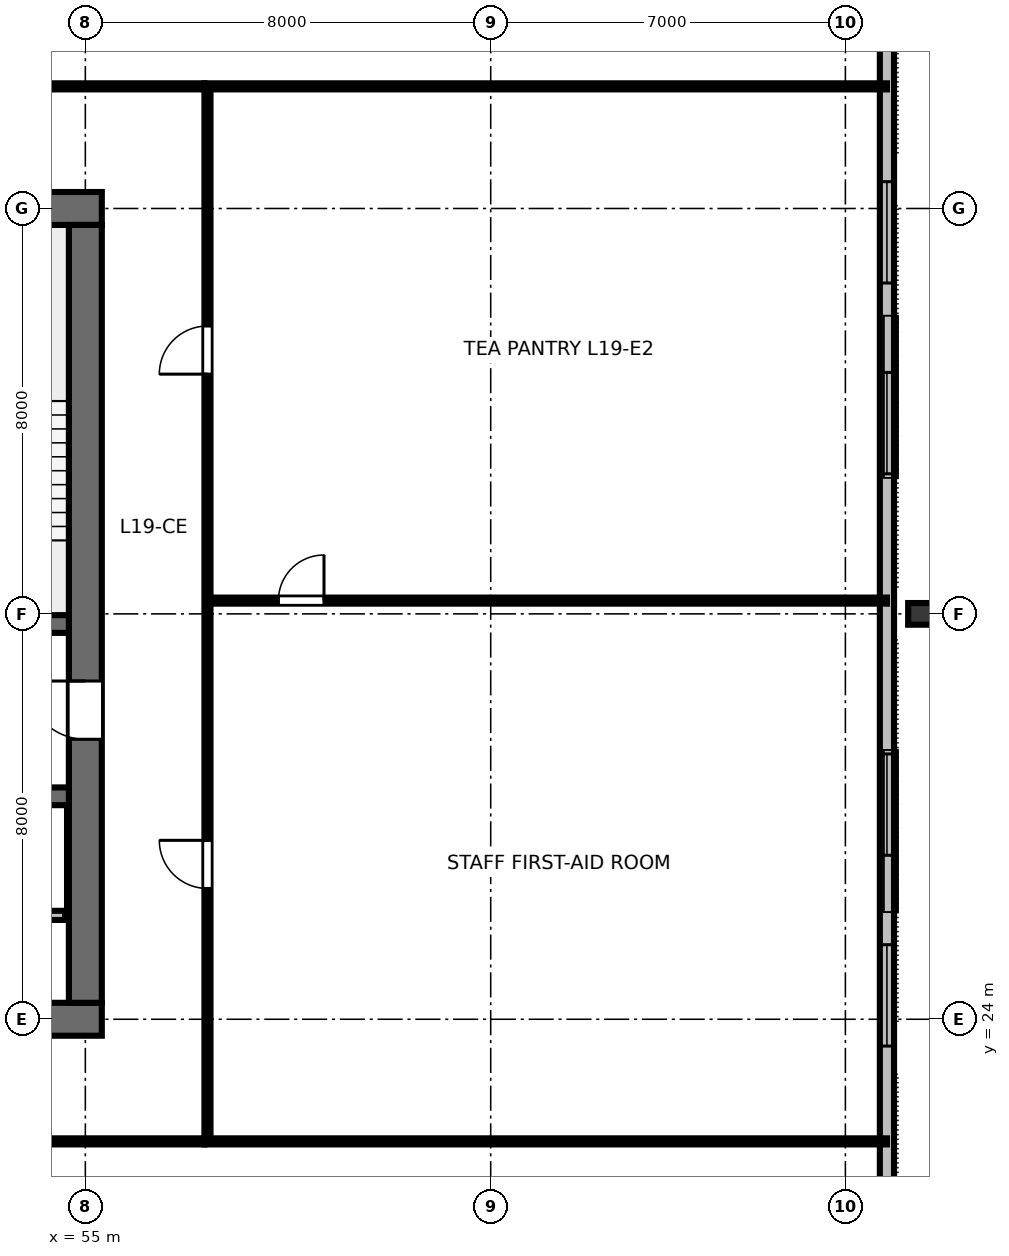
"""IFC4 building model, lengths in metres.
Left out: names, types, materials, properties, quantities, classifications, styles, units other than length and angle.
Written with IfcOpenShell. Run it as: python <this file> out.ifc"""

import sys

from ifc_helpers import new_model, si_unit, direction, frame, frame_2d, origin, origin_2d, place, context, subcontext, project, spatial, rectangle, i_section, extrude, element, fill, save


model = new_model("IFC4")
c1 = context("Model", 3, precision=1e-05, world=origin(), true_north=direction((0.0, 1.0)))
c2 = subcontext(c1, "Body", "Model", "MODEL_VIEW")
j1 = project(units=[si_unit("LENGTHUNIT", "METRE"), si_unit("PLANEANGLEUNIT", "RADIAN")], contexts=[c1])
p1 = place(None, origin())
s1 = spatial("IfcSite", under=j1, at=p1, CompositionType="ELEMENT")
p2 = place(p1, origin())
s2 = spatial("IfcBuilding", under=s1, at=p2, CompositionType="ELEMENT")
p3 = place(p2, frame((0.0, 0.0, 74.8)))
s3 = spatial("IfcBuildingStorey", under=s2, at=p3, CompositionType="ELEMENT", Elevation=74.8)
p4 = place(p3, frame((36.675, 24.0, 0.0), z_axis=(0.0, 0.0, 1.0), x_axis=(1.0, 0.0, 0.0)))
e1 = element("IfcWall", 1, at=p4, inside=s3, PredefinedType="SHEAR", context=c2, shape_type="SweptSolid", body=[
    extrude(rectangle(XDim=18.65, YDim=0.65, at=frame_2d((9.325, 0.0))), origin(), (0.0, 0.0, 1.0), 3.36),
])
p5 = place(p4, frame((5.725, 0.0, 0.0)))
e2 = element("IfcOpeningElement", 2, at=p5, cuts=e1, PredefinedType="OPENING", context=c2, shape_type="SweptSolid", body=[
    extrude(rectangle(XDim=1.6, YDim=2.15, at=frame_2d((0.8, 1.075))), frame((0.0, 0.335, 0.0), z_axis=(0.0, -1.0, 0.0), x_axis=(1.0, 0.0, 0.0)), (0.0, 0.0, 1.0), 0.67),
])
p6 = place(p4, frame((12.125, 0.0, 0.0)))
e3 = element("IfcOpeningElement", 3, at=p6, cuts=e1, PredefinedType="OPENING", context=c2, shape_type="SweptSolid", body=[
    extrude(rectangle(XDim=1.6, YDim=2.15, at=frame_2d((0.8, 1.075))), frame((0.0, 0.335, 0.0), z_axis=(0.0, -1.0, 0.0), x_axis=(1.0, 0.0, 0.0)), (0.0, 0.0, 1.0), 0.67),
])
p7 = place(p3, frame((36.675, 40.0, 0.0), z_axis=(0.0, 0.0, 1.0), x_axis=(1.0, 0.0, 0.0)))
e4 = element("IfcWall", 4, at=p7, inside=s3, PredefinedType="SHEAR", context=c2, shape_type="SweptSolid", body=[
    extrude(rectangle(XDim=18.65, YDim=0.65, at=frame_2d((9.325, 0.0))), origin(), (0.0, 0.0, 1.0), 3.36),
])
p8 = place(p7, frame((8.825, 0.0, 0.0)))
e5 = element("IfcOpeningElement", 5, at=p8, cuts=e4, PredefinedType="OPENING", context=c2, shape_type="SweptSolid", body=[
    extrude(rectangle(XDim=1.0, YDim=2.15, at=frame_2d((0.5, 1.075))), frame((0.0, 0.335, 0.0), z_axis=(0.0, -1.0, 0.0), x_axis=(1.0, 0.0, 0.0)), (0.0, 0.0, 1.0), 0.67),
])
p9 = place(p3, frame((55.0, 24.325, 0.0), z_axis=(0.0, 0.0, 1.0), x_axis=(0.0, 1.0, 0.0)))
e6 = element("IfcWall", 6, at=p9, inside=s3, PredefinedType="SHEAR", context=c2, shape_type="SweptSolid", body=[
    extrude(rectangle(XDim=15.35, YDim=0.65, at=frame_2d((7.675, 0.0))), origin(), (0.0, 0.0, 1.0), 3.36),
])
p10 = place(p9, frame((5.2, 0.0, 0.0)))
e7 = element("IfcOpeningElement", 7, at=p10, cuts=e6, PredefinedType="OPENING", context=c2, shape_type="SweptSolid", body=[
    extrude(rectangle(XDim=1.15, YDim=2.15, at=frame_2d((0.575, 1.075))), frame((0.0, 0.335, 0.0), z_axis=(0.0, -1.0, 0.0), x_axis=(1.0, 0.0, 0.0)), (0.0, 0.0, 1.0), 0.67),
])
p11 = place(p3, frame((37.325, 31.8, 0.0), z_axis=(0.0, 0.0, 1.0), x_axis=(1.0, 0.0, 0.0)))
e8 = element("IfcWall", 8, at=p11, inside=s3, PredefinedType="SHEAR", context=c2, shape_type="SweptSolid", body=[
    extrude(rectangle(XDim=17.35, YDim=0.35, at=frame_2d((8.675, 0.0))), origin(), (0.0, 0.0, 1.0), 3.36),
])
p12 = place(p11, frame((0.725, 0.0, 0.0)))
e9 = element("IfcOpeningElement", 9, at=p12, cuts=e8, PredefinedType="OPENING", context=c2, shape_type="SweptSolid", body=[
    extrude(rectangle(XDim=1.1, YDim=2.15, at=frame_2d((0.55, 1.075))), frame((0.0, 0.185, 0.0), z_axis=(0.0, -1.0, 0.0), x_axis=(1.0, 0.0, 0.0)), (0.0, 0.0, 1.0), 0.37),
])
p13 = place(p11, frame((14.625, 0.0, 0.0)))
e10 = element("IfcOpeningElement", 10, at=p13, cuts=e8, PredefinedType="OPENING", context=c2, shape_type="SweptSolid", body=[
    extrude(rectangle(XDim=1.1, YDim=2.15, at=frame_2d((0.55, 1.075))), frame((0.0, 0.185, 0.0), z_axis=(0.0, -1.0, 0.0), x_axis=(1.0, 0.0, 0.0)), (0.0, 0.0, 1.0), 0.37),
])
p14 = place(p3, frame((37.325, 28.4, 0.0), z_axis=(0.0, 0.0, 1.0), x_axis=(1.0, 0.0, 0.0)))
e11 = element("IfcWall", 11, at=p14, inside=s3, PredefinedType="SHEAR", context=c2, shape_type="SweptSolid", body=[
    extrude(rectangle(XDim=17.35, YDim=0.35, at=frame_2d((8.675, 0.0))), origin(), (0.0, 0.0, 1.0), 3.36),
])
p15 = place(p3, frame((71.48, 32.0, 0.0), z_axis=(0.0, 0.0, 1.0), x_axis=(0.0, 1.0, 0.0)))
e12 = element("IfcColumn", 12, at=p15, inside=s3, PredefinedType="COLUMN", context=c2, shape_type="SweptSolid", body=[
    extrude(i_section(OverallWidth=0.428, OverallDepth=0.483, WebThickness=0.051, FlangeThickness=0.082, FilletRadius=0.025, at=origin_2d()), origin(), (0.0, 0.0, 1.0), 3.358),
])
p16 = place(p3, frame((70.82, 13.96, 0.0), z_axis=(0.0, 0.0, 1.0), x_axis=(0.0, 1.0, 0.0)))
e13 = element("IfcWall", 13, at=p16, inside=s3, PredefinedType="STANDARD", context=c2, shape_type="SweptSolid", body=[
    extrude(rectangle(XDim=36.08, YDim=0.28, at=frame_2d((18.04, 0.0))), origin(), (0.0, 0.0, 1.0), 3.36),
])
p17 = place(p16, frame((1.982, 0.0, 0.8)))
e14 = element("IfcOpeningElement", 14, at=p17, cuts=e13, PredefinedType="OPENING", context=c2, shape_type="SweptSolid", body=[
    extrude(rectangle(XDim=2.0, YDim=1.95, at=frame_2d((1.0, 0.975))), frame((0.0, 0.15, 0.0), z_axis=(0.0, -1.0, 0.0), x_axis=(1.0, 0.0, 0.0)), (0.0, 0.0, 1.0), 0.3),
])
p18 = place(p16, frame((9.511, 0.0, 0.8)))
e15 = element("IfcOpeningElement", 15, at=p18, cuts=e13, PredefinedType="OPENING", context=c2, shape_type="SweptSolid", body=[
    extrude(rectangle(XDim=2.0, YDim=1.95, at=frame_2d((1.0, 0.975))), frame((0.0, 0.15, 0.0), z_axis=(0.0, -1.0, 0.0), x_axis=(1.0, 0.0, 0.0)), (0.0, 0.0, 1.0), 0.3),
])
p19 = place(p16, frame((13.276, 0.0, 0.8)))
e16 = element("IfcOpeningElement", 16, at=p19, cuts=e13, PredefinedType="OPENING", context=c2, shape_type="SweptSolid", body=[
    extrude(rectangle(XDim=2.0, YDim=1.95, at=frame_2d((1.0, 0.975))), frame((0.0, 0.15, 0.0), z_axis=(0.0, -1.0, 0.0), x_axis=(1.0, 0.0, 0.0)), (0.0, 0.0, 1.0), 0.3),
])
p20 = place(p16, frame((20.804, 0.0, 0.8)))
e17 = element("IfcOpeningElement", 17, at=p20, cuts=e13, PredefinedType="OPENING", context=c2, shape_type="SweptSolid", body=[
    extrude(rectangle(XDim=2.0, YDim=1.95, at=frame_2d((1.0, 0.975))), frame((0.0, 0.15, 0.0), z_axis=(0.0, -1.0, 0.0), x_axis=(1.0, 0.0, 0.0)), (0.0, 0.0, 1.0), 0.3),
])
p21 = place(p16, frame((24.569, 0.0, 0.8)))
e18 = element("IfcOpeningElement", 18, at=p21, cuts=e13, PredefinedType="OPENING", context=c2, shape_type="SweptSolid", body=[
    extrude(rectangle(XDim=2.0, YDim=1.95, at=frame_2d((1.0, 0.975))), frame((0.0, 0.15, 0.0), z_axis=(0.0, -1.0, 0.0), x_axis=(1.0, 0.0, 0.0)), (0.0, 0.0, 1.0), 0.3),
])
p22 = place(p16, frame((32.098, 0.0, 0.8)))
e19 = element("IfcOpeningElement", 19, at=p22, cuts=e13, PredefinedType="OPENING", context=c2, shape_type="SweptSolid", body=[
    extrude(rectangle(XDim=2.0, YDim=1.95, at=frame_2d((1.0, 0.975))), frame((0.0, 0.15, 0.0), z_axis=(0.0, -1.0, 0.0), x_axis=(1.0, 0.0, 0.0)), (0.0, 0.0, 1.0), 0.3),
])
p23 = place(p3, frame((37.4, 26.05, 0.0), z_axis=(0.0, 0.0, 1.0), x_axis=(1.0, 0.0, 0.0)))
e20 = element("IfcWall", 20, at=p23, inside=s3, PredefinedType="PARTITIONING", context=c2, shape_type="SweptSolid", body=[
    extrude(rectangle(XDim=17.2, YDim=0.18, at=frame_2d((8.6, 0.0))), origin(), (0.0, 0.0, 1.0), 3.36),
])
p24 = place(p23, frame((1.1, 0.0, 0.0)))
e21 = element("IfcOpeningElement", 21, at=p24, cuts=e20, PredefinedType="OPENING", context=c2, shape_type="SweptSolid", body=[
    extrude(rectangle(XDim=1.05, YDim=2.15, at=frame_2d((0.525, 1.075))), frame((0.0, 0.1, 0.0), z_axis=(0.0, -1.0, 0.0), x_axis=(1.0, 0.0, 0.0)), (0.0, 0.0, 1.0), 0.2),
])
p25 = place(p23, frame((3.0, 0.0, 0.0)))
e22 = element("IfcOpeningElement", 22, at=p25, cuts=e20, PredefinedType="OPENING", context=c2, shape_type="SweptSolid", body=[
    extrude(rectangle(XDim=1.05, YDim=2.15, at=frame_2d((0.525, 1.075))), frame((0.0, 0.1, 0.0), z_axis=(0.0, -1.0, 0.0), x_axis=(1.0, 0.0, 0.0)), (0.0, 0.0, 1.0), 0.2),
])
p26 = place(p3, frame((34.65, 21.59, 0.0), z_axis=(0.0, 0.0, 1.0), x_axis=(1.0, 0.0, 0.0)))
e23 = element("IfcWall", 23, at=p26, inside=s3, PredefinedType="PARTITIONING", context=c2, shape_type="SweptSolid", body=[
    extrude(rectangle(XDim=22.7, YDim=0.12, at=frame_2d((11.35, 0.0))), origin(), (0.0, 0.0, 1.0), 2.64),
])
p27 = place(p26, frame((3.463, 0.0, 0.0)))
e24 = element("IfcOpeningElement", 24, at=p27, cuts=e23, PredefinedType="OPENING", context=c2, shape_type="SweptSolid", body=[
    extrude(rectangle(XDim=0.95, YDim=2.15, at=frame_2d((0.475, 1.075))), frame((0.0, 0.07, 0.0), z_axis=(0.0, -1.0, 0.0), x_axis=(1.0, 0.0, 0.0)), (0.0, 0.0, 1.0), 0.14),
])
p28 = place(p26, frame((14.673, 0.0, 0.0)))
e25 = element("IfcOpeningElement", 25, at=p28, cuts=e23, PredefinedType="OPENING", context=c2, shape_type="SweptSolid", body=[
    extrude(rectangle(XDim=0.95, YDim=2.15, at=frame_2d((0.475, 1.075))), frame((0.0, 0.07, 0.0), z_axis=(0.0, -1.0, 0.0), x_axis=(1.0, 0.0, 0.0)), (0.0, 0.0, 1.0), 0.14),
])
p29 = place(p3, frame((34.65, 42.41, 0.0), z_axis=(0.0, 0.0, 1.0), x_axis=(1.0, 0.0, 0.0)))
e26 = element("IfcWall", 26, at=p29, inside=s3, PredefinedType="PARTITIONING", context=c2, shape_type="SweptSolid", body=[
    extrude(rectangle(XDim=22.7, YDim=0.12, at=frame_2d((11.35, 0.0))), origin(), (0.0, 0.0, 1.0), 2.64),
])
p30 = place(p29, frame((4.272, 0.0, 0.0)))
e27 = element("IfcOpeningElement", 27, at=p30, cuts=e26, PredefinedType="OPENING", context=c2, shape_type="SweptSolid", body=[
    extrude(rectangle(XDim=0.95, YDim=2.15, at=frame_2d((0.475, 1.075))), frame((0.0, 0.07, 0.0), z_axis=(0.0, -1.0, 0.0), x_axis=(1.0, 0.0, 0.0)), (0.0, 0.0, 1.0), 0.14),
])
p31 = place(p29, frame((11.432, 0.0, 0.0)))
e28 = element("IfcOpeningElement", 28, at=p31, cuts=e26, PredefinedType="OPENING", context=c2, shape_type="SweptSolid", body=[
    extrude(rectangle(XDim=0.95, YDim=2.15, at=frame_2d((0.475, 1.075))), frame((0.0, 0.07, 0.0), z_axis=(0.0, -1.0, 0.0), x_axis=(1.0, 0.0, 0.0)), (0.0, 0.0, 1.0), 0.14),
])
p32 = place(p29, frame((18.035, 0.0, 0.0)))
e29 = element("IfcOpeningElement", 29, at=p32, cuts=e26, PredefinedType="OPENING", context=c2, shape_type="SweptSolid", body=[
    extrude(rectangle(XDim=0.95, YDim=2.15, at=frame_2d((0.475, 1.075))), frame((0.0, 0.07, 0.0), z_axis=(0.0, -1.0, 0.0), x_axis=(1.0, 0.0, 0.0)), (0.0, 0.0, 1.0), 0.14),
])
p33 = place(p3, frame((57.41, 32.262, 0.0), z_axis=(0.0, 0.0, 1.0), x_axis=(1.0, 0.0, 0.0)))
e30 = element("IfcWall", 30, at=p33, inside=s3, PredefinedType="PARTITIONING", context=c2, shape_type="SweptSolid", body=[
    extrude(rectangle(XDim=13.41, YDim=0.12, at=frame_2d((6.705, 0.0))), origin(), (0.0, 0.0, 1.0), 2.64),
])
p34 = place(p33, frame((1.4, 0.0, 0.0)))
e31 = element("IfcOpeningElement", 31, at=p34, cuts=e30, PredefinedType="OPENING", context=c2, shape_type="SweptSolid", body=[
    extrude(rectangle(XDim=0.9, YDim=2.15, at=frame_2d((0.45, 1.075))), frame((0.0, 0.07, 0.0), z_axis=(0.0, -1.0, 0.0), x_axis=(1.0, 0.0, 0.0)), (0.0, 0.0, 1.0), 0.14),
])
p35 = place(p3, frame((57.41, 21.65, 0.0), z_axis=(0.0, 0.0, 1.0), x_axis=(0.0, 1.0, 0.0)))
e32 = element("IfcWall", 32, at=p35, inside=s3, PredefinedType="PARTITIONING", context=c2, shape_type="SweptSolid", body=[
    extrude(rectangle(XDim=20.7, YDim=0.12, at=frame_2d((10.35, 0.0))), origin(), (0.0, 0.0, 1.0), 2.64),
])
p36 = place(p35, frame((4.931, 0.0, 0.0)))
e33 = element("IfcOpeningElement", 33, at=p36, cuts=e32, PredefinedType="OPENING", context=c2, shape_type="SweptSolid", body=[
    extrude(rectangle(XDim=0.95, YDim=2.15, at=frame_2d((0.475, 1.075))), frame((0.0, 0.07, 0.0), z_axis=(0.0, -1.0, 0.0), x_axis=(1.0, 0.0, 0.0)), (0.0, 0.0, 1.0), 0.14),
])
p37 = place(p35, frame((15.081, 0.0, 0.0)))
e34 = element("IfcOpeningElement", 34, at=p37, cuts=e32, PredefinedType="OPENING", context=c2, shape_type="SweptSolid", body=[
    extrude(rectangle(XDim=0.95, YDim=2.15, at=frame_2d((0.475, 1.075))), frame((0.0, 0.07, 0.0), z_axis=(0.0, -1.0, 0.0), x_axis=(1.0, 0.0, 0.0)), (0.0, 0.0, 1.0), 0.14),
])
for number, where, z_axis, x_axis in (
    (35, (57.35, 21.59, 0.0), (0.0, 0.0, 1.0), (1.0, 0.0, 0.0)),
    (36, (57.35, 42.41, 0.0), (0.0, 0.0, 1.0), (1.0, 0.0, 0.0)),
):
    element("IfcWall", number, at=place(p3, frame(where, z_axis=z_axis, x_axis=x_axis)), inside=s3, PredefinedType="PARTITIONING", context=c2, shape_type="SweptSolid", body=[
        extrude(rectangle(XDim=13.47, YDim=0.12, at=frame_2d((6.735, 0.0))), origin(), (0.0, 0.0, 1.0), 2.64),
    ])
p38 = place(p18, origin())
e37 = element("IfcWindow", 37, at=p38, inside=s3, PartitioningType="SINGLE_PANEL", PredefinedType="WINDOW", context=c2, shape_type="SweptSolid", body=[
    extrude(rectangle(XDim=2.0, YDim=1.95, at=frame_2d((1.0, 0.975))), frame((0.0, 0.03, 0.0), z_axis=(0.0, -1.0, 0.0), x_axis=(1.0, 0.0, 0.0)), (0.0, 0.0, 1.0), 0.06),
])
fill(e15, e37)
p39 = place(p19, origin())
e38 = element("IfcWindow", 38, at=p39, inside=s3, PartitioningType="SINGLE_PANEL", PredefinedType="WINDOW", context=c2, shape_type="SweptSolid", body=[
    extrude(rectangle(XDim=2.0, YDim=1.95, at=frame_2d((1.0, 0.975))), frame((0.0, 0.03, 0.0), z_axis=(0.0, -1.0, 0.0), x_axis=(1.0, 0.0, 0.0)), (0.0, 0.0, 1.0), 0.06),
])
fill(e16, e38)
p40 = place(p20, origin())
e39 = element("IfcWindow", 39, at=p40, inside=s3, PartitioningType="SINGLE_PANEL", PredefinedType="WINDOW", context=c2, shape_type="SweptSolid", body=[
    extrude(rectangle(XDim=2.0, YDim=1.95, at=frame_2d((1.0, 0.975))), frame((0.0, 0.03, 0.0), z_axis=(0.0, -1.0, 0.0), x_axis=(1.0, 0.0, 0.0)), (0.0, 0.0, 1.0), 0.06),
])
fill(e17, e39)
p41 = place(p21, origin())
e40 = element("IfcWindow", 40, at=p41, inside=s3, PartitioningType="SINGLE_PANEL", PredefinedType="WINDOW", context=c2, shape_type="SweptSolid", body=[
    extrude(rectangle(XDim=2.0, YDim=1.95, at=frame_2d((1.0, 0.975))), frame((0.0, 0.03, 0.0), z_axis=(0.0, -1.0, 0.0), x_axis=(1.0, 0.0, 0.0)), (0.0, 0.0, 1.0), 0.06),
])
fill(e18, e40)
p42 = place(p10, origin())
e41 = element("IfcDoor", 41, at=p42, inside=s3, OperationType="SINGLE_SWING_RIGHT", PredefinedType="DOOR", context=c2, shape_type="SweptSolid", body=[
    extrude(rectangle(XDim=1.15, YDim=2.15, at=frame_2d((0.575, 1.075))), frame((0.0, 0.025, 0.0), z_axis=(0.0, -1.0, 0.0), x_axis=(1.0, 0.0, 0.0)), (0.0, 0.0, 1.0), 0.05),
])
fill(e7, e41)
p43 = place(p34, origin())
e42 = element("IfcDoor", 42, at=p43, inside=s3, OperationType="SINGLE_SWING_RIGHT", PredefinedType="DOOR", context=c2, shape_type="SweptSolid", body=[
    extrude(rectangle(XDim=0.9, YDim=2.15, at=frame_2d((0.45, 1.075))), frame((0.0, 0.025, 0.0), z_axis=(0.0, -1.0, 0.0), x_axis=(1.0, 0.0, 0.0)), (0.0, 0.0, 1.0), 0.05),
])
fill(e31, e42)
p44 = place(p36, origin())
e43 = element("IfcDoor", 43, at=p44, inside=s3, OperationType="SINGLE_SWING_RIGHT", PredefinedType="DOOR", context=c2, shape_type="SweptSolid", body=[
    extrude(rectangle(XDim=0.95, YDim=2.15, at=frame_2d((0.475, 1.075))), frame((0.0, 0.025, 0.0), z_axis=(0.0, -1.0, 0.0), x_axis=(1.0, 0.0, 0.0)), (0.0, 0.0, 1.0), 0.05),
])
fill(e33, e43)
p45 = place(p37, origin())
e44 = element("IfcDoor", 44, at=p45, inside=s3, OperationType="SINGLE_SWING_LEFT", PredefinedType="DOOR", context=c2, shape_type="SweptSolid", body=[
    extrude(rectangle(XDim=0.95, YDim=2.15, at=frame_2d((0.475, 1.075))), frame((0.0, 0.025, 0.0), z_axis=(0.0, -1.0, 0.0), x_axis=(1.0, 0.0, 0.0)), (0.0, 0.0, 1.0), 0.05),
])
fill(e34, e44)
save(model, sys.argv[1])
